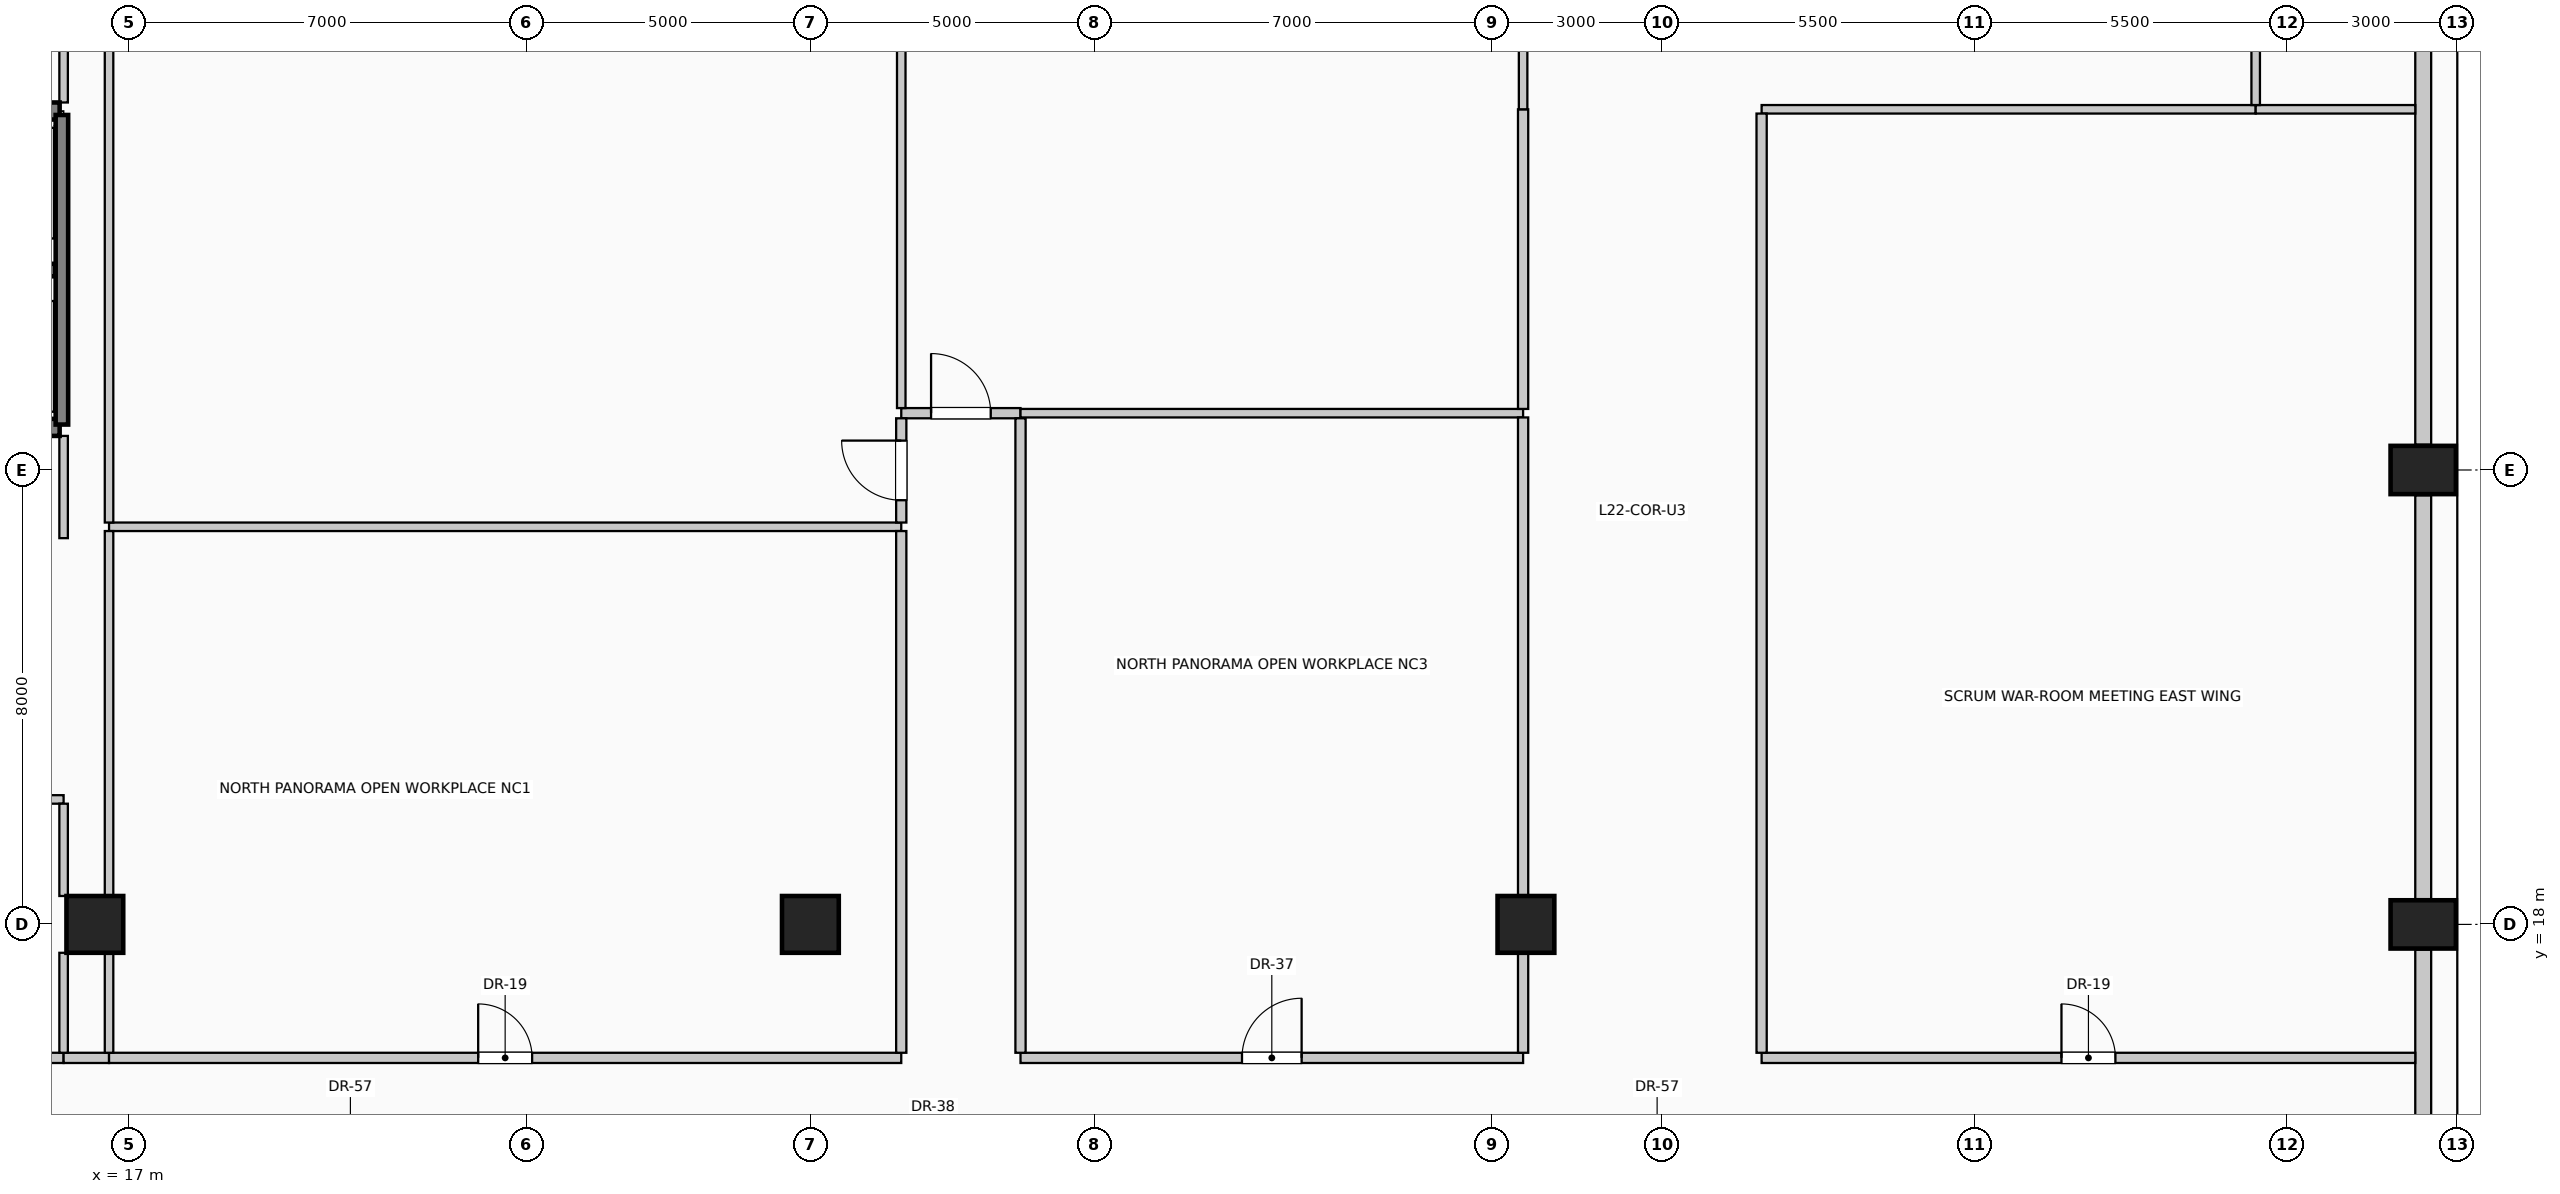
"""IFC4 building model, lengths in metres.
Left out: names, types, materials, properties, quantities, classifications, styles, units other than length and angle.
Written with IfcOpenShell. Run it as: python <this file> out.ifc"""

import sys

from ifc_helpers import new_model, si_unit, direction, frame, frame_2d, origin, origin_2d, place, context, subcontext, project, spatial, rectangle, circle, extrude, element, fill, save


model = new_model("IFC4")
c1 = context("Model", 3, precision=1e-05, world=origin(), true_north=direction((0.0, 1.0)))
c2 = subcontext(c1, "Body", "Model", "MODEL_VIEW")
j1 = project(units=[si_unit("LENGTHUNIT", "METRE"), si_unit("PLANEANGLEUNIT", "RADIAN")], contexts=[c1])
p1 = place(None, origin())
s1 = spatial("IfcSite", under=j1, at=p1, CompositionType="ELEMENT")
p2 = place(p1, origin())
s2 = spatial("IfcBuilding", under=s1, at=p2, CompositionType="ELEMENT")
p3 = place(p2, frame((0.0, 0.0, 92.6)))
s3 = spatial("IfcBuildingStorey", under=s2, at=p3, CompositionType="ELEMENT", Elevation=92.6)
for number, where, z_axis, x_axis in (
    (1, (57.4, 18.0, 0.0), (0.0, 0.0, 1.0), (0.0, 1.0, 0.0)),
    (2, (57.4, 26.0, 0.0), (0.0, 0.0, 1.0), (0.0, 1.0, 0.0)),
):
    element("IfcColumn", number, at=place(p3, frame(where, z_axis=z_axis, x_axis=x_axis)), inside=s3, PredefinedType="COLUMN", context=c2, shape_type="SweptSolid", body=[
        extrude(rectangle(XDim=0.85, YDim=1.15, at=origin_2d()), origin(), (0.0, 0.0, 1.0), 4.0),
    ])
for number, where, z_axis, x_axis in (
    (3, (16.4, 18.0, 0.0), (0.0, 0.0, 1.0), (1.0, 0.0, 0.0)),
    (4, (29.0, 18.0, 0.0), (0.0, 0.0, 1.0), (1.0, 0.0, 0.0)),
    (5, (41.6, 18.0, 0.0), (0.0, 0.0, 1.0), (1.0, 0.0, 0.0)),
):
    element("IfcColumn", number, at=place(p3, frame(where, z_axis=z_axis, x_axis=x_axis)), inside=s3, PredefinedType="COLUMN", context=c2, shape_type="SweptSolid", body=[
        extrude(circle(Radius=0.5, at=origin_2d()), origin(), (0.0, 0.0, 1.0), 4.0),
    ])
for number, where, z_axis, x_axis in (
    (6, (57.4, 17.555, 0.0), (0.0, 0.0, 1.0), (0.0, -1.0, 0.0)),
    (7, (57.4, 25.555, 0.0), (0.0, 0.0, 1.0), (0.0, -1.0, 0.0)),
    (8, (57.4, 33.555, 0.0), (0.0, 0.0, 1.0), (0.0, -1.0, 0.0)),
):
    element("IfcWall", number, at=place(p3, frame(where, z_axis=z_axis, x_axis=x_axis)), inside=s3, PredefinedType="SOLIDWALL", context=c2, shape_type="SweptSolid", body=[
        extrude(rectangle(XDim=7.11, YDim=0.28, at=frame_2d((3.555, 0.0))), origin(), (0.0, 0.0, 1.0), 2.875),
    ])
p4 = place(p3, frame((15.78, 26.75, 0.0), z_axis=(0.0, 0.0, 1.0), x_axis=(-1.0, 0.0, 0.0)))
e9 = element("IfcWall", 9, at=p4, inside=s3, PredefinedType="SOLIDWALL", context=c2, shape_type="SweptSolid", body=[
    extrude(rectangle(XDim=1.78, YDim=0.3, at=frame_2d((0.89, 0.0))), origin(), (0.0, 0.0, 1.0), 4.0),
])
p5 = place(p4, frame((0.34, 0.0, 0.0)))
e10 = element("IfcOpeningElement", 10, at=p5, cuts=e9, PredefinedType="OPENING", context=c2, shape_type="SweptSolid", body=[
    extrude(rectangle(XDim=1.1, YDim=2.2, at=frame_2d((0.55, 1.1))), frame((0.0, 0.16, 0.0), z_axis=(0.0, -1.0, 0.0), x_axis=(1.0, 0.0, 0.0)), (0.0, 0.0, 1.0), 0.32),
])
p6 = place(p3, frame((14.0, 32.32, 0.0), z_axis=(0.0, 0.0, 1.0), x_axis=(1.0, 0.0, 0.0)))
e11 = element("IfcWall", 11, at=p6, inside=s3, PredefinedType="SOLIDWALL", context=c2, shape_type="SweptSolid", body=[
    extrude(rectangle(XDim=1.78, YDim=0.3, at=frame_2d((0.89, 0.0))), origin(), (0.0, 0.0, 1.0), 4.0),
])
p7 = place(p6, frame((0.34, 0.0, 0.0)))
e12 = element("IfcOpeningElement", 12, at=p7, cuts=e11, PredefinedType="OPENING", context=c2, shape_type="SweptSolid", body=[
    extrude(rectangle(XDim=1.1, YDim=2.2, at=frame_2d((0.55, 1.1))), frame((0.0, 0.16, 0.0), z_axis=(0.0, -1.0, 0.0), x_axis=(1.0, 0.0, 0.0)), (0.0, 0.0, 1.0), 0.32),
])
p8 = place(p3, frame((15.82, 26.8, 0.0), z_axis=(0.0, 0.0, 1.0), x_axis=(0.0, 1.0, 0.0)))
e13 = element("IfcWall", 13, at=p8, inside=s3, PredefinedType="SOLIDWALL", context=c2, shape_type="SweptSolid", body=[
    extrude(rectangle(XDim=5.45, YDim=0.22, at=frame_2d((2.725, 0.0))), origin(), (0.0, 0.0, 1.0), 4.0),
])
p9 = place(p3, frame((12.3, 29.52, 0.0), z_axis=(0.0, 0.0, 1.0), x_axis=(1.0, 0.0, 0.0)))
e14 = element("IfcWall", 14, at=p9, inside=s3, PredefinedType="SOLIDWALL", context=c2, shape_type="SweptSolid", body=[
    extrude(rectangle(XDim=3.4, YDim=0.22, at=frame_2d((1.7, 0.0))), origin(), (0.0, 0.0, 1.0), 4.0),
])
p10 = place(p3, frame((3.55, 15.65, 0.0), z_axis=(0.0, 0.0, 1.0), x_axis=(1.0, 0.0, 0.0)))
e15 = element("IfcWall", 15, at=p10, inside=s3, PredefinedType="PARTITIONING", context=c2, shape_type="SweptSolid", body=[
    extrude(rectangle(XDim=12.3, YDim=0.18, at=frame_2d((6.15, 0.0))), origin(), (0.0, 0.0, 1.0), 3.725),
])
p11 = place(p10, frame((5.675, 0.0, 0.0)))
e16 = element("IfcOpeningElement", 16, at=p11, cuts=e15, PredefinedType="OPENING", context=c2, shape_type="SweptSolid", body=[
    extrude(rectangle(XDim=0.95, YDim=2.15, at=frame_2d((0.475, 1.075))), frame((0.0, 0.1, 0.0), z_axis=(0.0, -1.0, 0.0), x_axis=(1.0, 0.0, 0.0)), (0.0, 0.0, 1.0), 0.2),
])
p12 = place(p3, frame((15.85, 15.65, 0.0), z_axis=(0.0, 0.0, 1.0), x_axis=(1.0, 0.0, 0.0)))
e17 = element("IfcWall", 17, at=p12, inside=s3, PredefinedType="PARTITIONING", context=c2, shape_type="SweptSolid", body=[
    extrude(rectangle(XDim=0.8, YDim=0.18, at=frame_2d((0.4, 0.0))), origin(), (0.0, 0.0, 1.0), 3.725),
])
p13 = place(p3, frame((16.65, 15.65, 0.0), z_axis=(0.0, 0.0, 1.0), x_axis=(1.0, 0.0, 0.0)))
e18 = element("IfcWall", 18, at=p13, inside=s3, PredefinedType="PARTITIONING", context=c2, shape_type="SweptSolid", body=[
    extrude(rectangle(XDim=13.95, YDim=0.18, at=frame_2d((6.975, 0.0))), origin(), (0.0, 0.0, 1.0), 3.725),
])
p14 = place(p13, frame((6.5, 0.0, 0.0)))
e19 = element("IfcOpeningElement", 19, at=p14, cuts=e18, PredefinedType="OPENING", context=c2, shape_type="SweptSolid", body=[
    extrude(rectangle(XDim=0.95, YDim=2.15, at=frame_2d((0.475, 1.075))), frame((0.0, 0.1, 0.0), z_axis=(0.0, -1.0, 0.0), x_axis=(1.0, 0.0, 0.0)), (0.0, 0.0, 1.0), 0.2),
])
p15 = place(p3, frame((32.7, 15.65, 0.0), z_axis=(0.0, 0.0, 1.0), x_axis=(1.0, 0.0, 0.0)))
e20 = element("IfcWall", 20, at=p15, inside=s3, PredefinedType="PARTITIONING", context=c2, shape_type="SweptSolid", body=[
    extrude(rectangle(XDim=8.85, YDim=0.18, at=frame_2d((4.425, 0.0))), origin(), (0.0, 0.0, 1.0), 3.725),
])
p16 = place(p15, frame((3.9, 0.0, 0.0)))
e21 = element("IfcOpeningElement", 21, at=p16, cuts=e20, PredefinedType="OPENING", context=c2, shape_type="SweptSolid", body=[
    extrude(rectangle(XDim=1.05, YDim=2.15, at=frame_2d((0.525, 1.075))), frame((0.0, 0.1, 0.0), z_axis=(0.0, -1.0, 0.0), x_axis=(1.0, 0.0, 0.0)), (0.0, 0.0, 1.0), 0.2),
])
p17 = place(p3, frame((45.75, 15.65, 0.0), z_axis=(0.0, 0.0, 1.0), x_axis=(1.0, 0.0, 0.0)))
e22 = element("IfcWall", 22, at=p17, inside=s3, PredefinedType="PARTITIONING", context=c2, shape_type="SweptSolid", body=[
    extrude(rectangle(XDim=11.51, YDim=0.18, at=frame_2d((5.755, 0.0))), origin(), (0.0, 0.0, 1.0), 3.725),
])
p18 = place(p17, frame((5.28, 0.0, 0.0)))
e23 = element("IfcOpeningElement", 23, at=p18, cuts=e22, PredefinedType="OPENING", context=c2, shape_type="SweptSolid", body=[
    extrude(rectangle(XDim=0.95, YDim=2.15, at=frame_2d((0.475, 1.075))), frame((0.0, 0.1, 0.0), z_axis=(0.0, -1.0, 0.0), x_axis=(1.0, 0.0, 0.0)), (0.0, 0.0, 1.0), 0.2),
])
p19 = place(p3, frame((12.2, 20.2, 0.0), z_axis=(0.0, 0.0, 1.0), x_axis=(1.0, 0.0, 0.0)))
e24 = element("IfcWall", 24, at=p19, inside=s3, PredefinedType="PARTITIONING", context=c2, shape_type="SweptSolid", body=[
    extrude(rectangle(XDim=3.65, YDim=0.15, at=frame_2d((1.825, 0.0))), origin(), (0.0, 0.0, 1.0), 3.725),
])
p20 = place(p3, frame((16.65, 25.0, 0.0), z_axis=(0.0, 0.0, 1.0), x_axis=(1.0, 0.0, 0.0)))
e25 = element("IfcWall", 25, at=p20, inside=s3, PredefinedType="PARTITIONING", context=c2, shape_type="SweptSolid", body=[
    extrude(rectangle(XDim=13.95, YDim=0.15, at=frame_2d((6.975, 0.0))), origin(), (0.0, 0.0, 1.0), 3.725),
])
p21 = place(p3, frame((30.6, 27.0, 0.0), z_axis=(0.0, 0.0, 1.0), x_axis=(1.0, 0.0, 0.0)))
e26 = element("IfcWall", 26, at=p21, inside=s3, PredefinedType="PARTITIONING", context=c2, shape_type="SweptSolid", body=[
    extrude(rectangle(XDim=2.1, YDim=0.18, at=frame_2d((1.05, 0.0))), origin(), (0.0, 0.0, 1.0), 3.725),
])
p22 = place(p21, frame((0.525, 0.0, 0.0)))
e27 = element("IfcOpeningElement", 27, at=p22, cuts=e26, PredefinedType="OPENING", context=c2, shape_type="SweptSolid", body=[
    extrude(rectangle(XDim=1.05, YDim=2.15, at=frame_2d((0.525, 1.075))), frame((0.0, 0.1, 0.0), z_axis=(0.0, -1.0, 0.0), x_axis=(1.0, 0.0, 0.0)), (0.0, 0.0, 1.0), 0.2),
])
p23 = place(p3, frame((32.7, 27.0, 0.0), z_axis=(0.0, 0.0, 1.0), x_axis=(1.0, 0.0, 0.0)))
e28 = element("IfcWall", 28, at=p23, inside=s3, PredefinedType="PARTITIONING", context=c2, shape_type="SweptSolid", body=[
    extrude(rectangle(XDim=8.85, YDim=0.15, at=frame_2d((4.425, 0.0))), origin(), (0.0, 0.0, 1.0), 3.725),
])
p24 = place(p3, frame((45.75, 32.35, 0.0), z_axis=(0.0, 0.0, 1.0), x_axis=(1.0, 0.0, 0.0)))
e29 = element("IfcWall", 29, at=p24, inside=s3, PredefinedType="PARTITIONING", context=c2, shape_type="SweptSolid", body=[
    extrude(rectangle(XDim=8.7, YDim=0.15, at=frame_2d((4.35, 0.0))), origin(), (0.0, 0.0, 1.0), 3.725),
])
p25 = place(p3, frame((54.45, 32.35, 0.0), z_axis=(0.0, 0.0, 1.0), x_axis=(1.0, 0.0, 0.0)))
e30 = element("IfcWall", 30, at=p25, inside=s3, PredefinedType="PARTITIONING", context=c2, shape_type="SweptSolid", body=[
    extrude(rectangle(XDim=2.81, YDim=0.15, at=frame_2d((1.405, 0.0))), origin(), (0.0, 0.0, 1.0), 3.725),
])
p26 = place(p3, frame((15.85, 15.74, 0.0), z_axis=(0.0, 0.0, 1.0), x_axis=(0.0, 1.0, 0.0)))
e31 = element("IfcWall", 31, at=p26, inside=s3, PredefinedType="PARTITIONING", context=c2, shape_type="SweptSolid", body=[
    extrude(rectangle(XDim=1.76, YDim=0.15, at=frame_2d((0.88, 0.0))), origin(), (0.0, 0.0, 1.0), 3.725),
])
p27 = place(p3, frame((15.85, 18.5, 0.0), z_axis=(0.0, 0.0, 1.0), x_axis=(0.0, 1.0, 0.0)))
e32 = element("IfcWall", 32, at=p27, inside=s3, PredefinedType="PARTITIONING", context=c2, shape_type="SweptSolid", body=[
    extrude(rectangle(XDim=1.625, YDim=0.15, at=frame_2d((0.812, 0.0))), origin(), (0.0, 0.0, 1.0), 3.725),
])
p28 = place(p3, frame((15.85, 24.8, 0.0), z_axis=(0.0, 0.0, 1.0), x_axis=(0.0, 1.0, 0.0)))
e33 = element("IfcWall", 33, at=p28, inside=s3, PredefinedType="PARTITIONING", context=c2, shape_type="SweptSolid", body=[
    extrude(rectangle(XDim=1.8, YDim=0.15, at=frame_2d((0.9, 0.0))), origin(), (0.0, 0.0, 1.0), 3.725),
])
p29 = place(p3, frame((15.85, 32.47, 0.0), z_axis=(0.0, 0.0, 1.0), x_axis=(0.0, 1.0, 0.0)))
e34 = element("IfcWall", 34, at=p29, inside=s3, PredefinedType="PARTITIONING", context=c2, shape_type="SweptSolid", body=[
    extrude(rectangle(XDim=1.03, YDim=0.15, at=frame_2d((0.515, 0.0))), origin(), (0.0, 0.0, 1.0), 3.725),
])
p30 = place(p3, frame((16.65, 15.74, 0.0), z_axis=(0.0, 0.0, 1.0), x_axis=(0.0, 1.0, 0.0)))
e35 = element("IfcWall", 35, at=p30, inside=s3, PredefinedType="PARTITIONING", context=c2, shape_type="SweptSolid", body=[
    extrude(rectangle(XDim=1.76, YDim=0.15, at=frame_2d((0.88, 0.0))), origin(), (0.0, 0.0, 1.0), 3.07),
])
p31 = place(p3, frame((16.65, 18.5, 0.0), z_axis=(0.0, 0.0, 1.0), x_axis=(0.0, 1.0, 0.0)))
e36 = element("IfcWall", 36, at=p31, inside=s3, PredefinedType="PARTITIONING", context=c2, shape_type="SweptSolid", body=[
    extrude(rectangle(XDim=6.425, YDim=0.15, at=frame_2d((3.212, 0.0))), origin(), (0.0, 0.0, 1.0), 3.07),
])
p32 = place(p3, frame((16.65, 25.075, 0.0), z_axis=(0.0, 0.0, 1.0), x_axis=(0.0, 1.0, 0.0)))
e37 = element("IfcWall", 37, at=p32, inside=s3, PredefinedType="PARTITIONING", context=c2, shape_type="SweptSolid", body=[
    extrude(rectangle(XDim=8.425, YDim=0.15, at=frame_2d((4.212, 0.0))), origin(), (0.0, 0.0, 1.0), 3.07),
])
p33 = place(p3, frame((30.6, 15.74, 0.0), z_axis=(0.0, 0.0, 1.0), x_axis=(0.0, 1.0, 0.0)))
e38 = element("IfcWall", 38, at=p33, inside=s3, PredefinedType="PARTITIONING", context=c2, shape_type="SweptSolid", body=[
    extrude(rectangle(XDim=9.185, YDim=0.18, at=frame_2d((4.593, 0.0))), origin(), (0.0, 0.0, 1.0), 3.725),
])
p34 = place(p3, frame((30.6, 25.075, 0.0), z_axis=(0.0, 0.0, 1.0), x_axis=(0.0, 1.0, 0.0)))
e39 = element("IfcWall", 39, at=p34, inside=s3, PredefinedType="PARTITIONING", context=c2, shape_type="SweptSolid", body=[
    extrude(rectangle(XDim=1.835, YDim=0.18, at=frame_2d((0.917, 0.0))), origin(), (0.0, 0.0, 1.0), 3.725),
])
p35 = place(p34, frame((0.393, 0.0, 0.0)))
e40 = element("IfcOpeningElement", 40, at=p35, cuts=e39, PredefinedType="OPENING", context=c2, shape_type="SweptSolid", body=[
    extrude(rectangle(XDim=1.05, YDim=2.15, at=frame_2d((0.525, 1.075))), frame((0.0, 0.1, 0.0), z_axis=(0.0, -1.0, 0.0), x_axis=(1.0, 0.0, 0.0)), (0.0, 0.0, 1.0), 0.2),
])
p36 = place(p3, frame((30.6, 27.09, 0.0), z_axis=(0.0, 0.0, 1.0), x_axis=(0.0, 1.0, 0.0)))
e41 = element("IfcWall", 41, at=p36, inside=s3, PredefinedType="PARTITIONING", context=c2, shape_type="SweptSolid", body=[
    extrude(rectangle(XDim=18.17, YDim=0.15, at=frame_2d((9.085, 0.0))), origin(), (0.0, 0.0, 1.0), 3.725),
])
p37 = place(p3, frame((32.7, 15.74, 0.0), z_axis=(0.0, 0.0, 1.0), x_axis=(0.0, 1.0, 0.0)))
e42 = element("IfcWall", 42, at=p37, inside=s3, PredefinedType="PARTITIONING", context=c2, shape_type="SweptSolid", body=[
    extrude(rectangle(XDim=11.17, YDim=0.18, at=frame_2d((5.585, 0.0))), origin(), (0.0, 0.0, 1.0), 3.725),
])
p38 = place(p3, frame((41.55, 15.74, 0.0), z_axis=(0.0, 0.0, 1.0), x_axis=(0.0, 1.0, 0.0)))
e43 = element("IfcWall", 43, at=p38, inside=s3, PredefinedType="PARTITIONING", context=c2, shape_type="SweptSolid", body=[
    extrude(rectangle(XDim=1.76, YDim=0.18, at=frame_2d((0.88, 0.0))), origin(), (0.0, 0.0, 1.0), 3.07),
])
p39 = place(p3, frame((41.55, 18.5, 0.0), z_axis=(0.0, 0.0, 1.0), x_axis=(0.0, 1.0, 0.0)))
e44 = element("IfcWall", 44, at=p39, inside=s3, PredefinedType="PARTITIONING", context=c2, shape_type="SweptSolid", body=[
    extrude(rectangle(XDim=8.425, YDim=0.18, at=frame_2d((4.212, 0.0))), origin(), (0.0, 0.0, 1.0), 3.07),
])
p40 = place(p3, frame((41.55, 27.075, 0.0), z_axis=(0.0, 0.0, 1.0), x_axis=(0.0, 1.0, 0.0)))
e45 = element("IfcWall", 45, at=p40, inside=s3, PredefinedType="PARTITIONING", context=c2, shape_type="SweptSolid", body=[
    extrude(rectangle(XDim=5.275, YDim=0.18, at=frame_2d((2.638, 0.0))), origin(), (0.0, 0.0, 1.0), 3.07),
])
p41 = place(p3, frame((41.55, 32.35, 0.0), z_axis=(0.0, 0.0, 1.0), x_axis=(0.0, 1.0, 0.0)))
e46 = element("IfcWall", 46, at=p41, inside=s3, PredefinedType="PARTITIONING", context=c2, shape_type="SweptSolid", body=[
    extrude(rectangle(XDim=1.15, YDim=0.15, at=frame_2d((0.575, 0.0))), origin(), (0.0, 0.0, 1.0), 3.07),
])
p42 = place(p3, frame((45.75, 15.74, 0.0), z_axis=(0.0, 0.0, 1.0), x_axis=(0.0, 1.0, 0.0)))
e47 = element("IfcWall", 47, at=p42, inside=s3, PredefinedType="PARTITIONING", context=c2, shape_type="SweptSolid", body=[
    extrude(rectangle(XDim=16.535, YDim=0.18, at=frame_2d((8.268, 0.0))), origin(), (0.0, 0.0, 1.0), 3.725),
])
p43 = place(p3, frame((54.45, 32.425, 0.0), z_axis=(0.0, 0.0, 1.0), x_axis=(0.0, 1.0, 0.0)))
e48 = element("IfcWall", 48, at=p43, inside=s3, PredefinedType="PARTITIONING", context=c2, shape_type="SweptSolid", body=[
    extrude(rectangle(XDim=1.725, YDim=0.15, at=frame_2d((0.862, 0.0))), origin(), (0.0, 0.0, 1.0), 3.725),
])
p44 = place(p14, origin())
e49 = element("IfcDoor", 49, at=p44, inside=s3, OperationType="SINGLE_SWING_LEFT", PredefinedType="DOOR", context=c2, shape_type="SweptSolid", body=[
    extrude(rectangle(XDim=0.95, YDim=2.15, at=frame_2d((0.475, 1.075))), frame((0.0, 0.025, 0.0), z_axis=(0.0, -1.0, 0.0), x_axis=(1.0, 0.0, 0.0)), (0.0, 0.0, 1.0), 0.05),
])
fill(e19, e49)
p45 = place(p16, origin())
e50 = element("IfcDoor", 50, at=p45, inside=s3, OperationType="SINGLE_SWING_RIGHT", PredefinedType="DOOR", context=c2, shape_type="SweptSolid", body=[
    extrude(rectangle(XDim=1.05, YDim=2.15, at=frame_2d((0.525, 1.075))), frame((0.0, 0.025, 0.0), z_axis=(0.0, -1.0, 0.0), x_axis=(1.0, 0.0, 0.0)), (0.0, 0.0, 1.0), 0.05),
])
fill(e21, e50)
p46 = place(p18, origin())
e51 = element("IfcDoor", 51, at=p46, inside=s3, OperationType="SINGLE_SWING_LEFT", PredefinedType="DOOR", context=c2, shape_type="SweptSolid", body=[
    extrude(rectangle(XDim=0.95, YDim=2.15, at=frame_2d((0.475, 1.075))), frame((0.0, 0.025, 0.0), z_axis=(0.0, -1.0, 0.0), x_axis=(1.0, 0.0, 0.0)), (0.0, 0.0, 1.0), 0.05),
])
fill(e23, e51)
p47 = place(p22, origin())
e52 = element("IfcDoor", 52, at=p47, inside=s3, OperationType="SINGLE_SWING_LEFT", PredefinedType="DOOR", context=c2, shape_type="SweptSolid", body=[
    extrude(rectangle(XDim=1.05, YDim=2.15, at=frame_2d((0.525, 1.075))), frame((0.0, 0.025, 0.0), z_axis=(0.0, -1.0, 0.0), x_axis=(1.0, 0.0, 0.0)), (0.0, 0.0, 1.0), 0.05),
])
fill(e27, e52)
p48 = place(p35, origin())
e53 = element("IfcDoor", 53, at=p48, inside=s3, OperationType="SINGLE_SWING_RIGHT", PredefinedType="DOOR", context=c2, shape_type="SweptSolid", body=[
    extrude(rectangle(XDim=1.05, YDim=2.15, at=frame_2d((0.525, 1.075))), frame((0.0, 0.025, 0.0), z_axis=(0.0, -1.0, 0.0), x_axis=(1.0, 0.0, 0.0)), (0.0, 0.0, 1.0), 0.05),
])
fill(e40, e53)
save(model, sys.argv[1])
